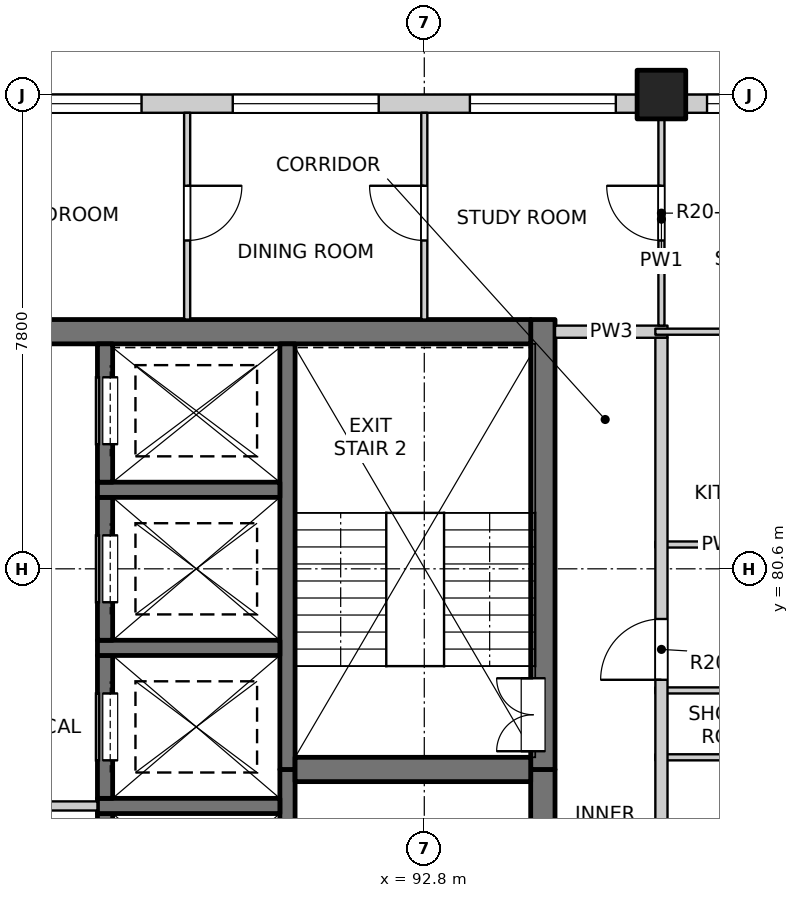
"""IFC4 building model, lengths in metres.
Left out: names, types, materials, properties, quantities, classifications, styles, units other than length and angle.
Written with IfcOpenShell. Run it as: python <this file> out.ifc"""

import sys

from ifc_helpers import new_model, si_unit, direction, frame, frame_2d, origin, origin_2d, place, context, subcontext, project, spatial, rectangle, extrude, element, fill, save


model = new_model("IFC4")
c1 = context("Model", 3, precision=1e-05, world=origin(), true_north=direction((0.0, 1.0)))
c2 = subcontext(c1, "Body", "Model", "MODEL_VIEW")
j1 = project(units=[si_unit("LENGTHUNIT", "METRE"), si_unit("PLANEANGLEUNIT", "RADIAN")], contexts=[c1])
p1 = place(None, origin())
s1 = spatial("IfcSite", under=j1, at=p1, CompositionType="ELEMENT")
p2 = place(p1, origin())
s2 = spatial("IfcBuilding", under=s1, at=p2, CompositionType="ELEMENT")
p3 = place(p2, frame((0.0, 0.0, 210.9)))
s3 = spatial("IfcBuildingStorey", under=s2, at=p3, CompositionType="ELEMENT", Elevation=210.9)
p4 = place(p3, frame((96.7, 88.4, -0.25), z_axis=(0.0, 0.0, 1.0), x_axis=(1.0, 0.0, 0.0)))
e1 = element("IfcColumn", 1, at=p4, inside=s3, PredefinedType="COLUMN", context=c2, shape_type="SweptSolid", body=[
    extrude(rectangle(XDim=0.8, YDim=0.8, at=origin_2d()), origin(), (0.0, 0.0, 1.0), 3.4),
])
p5 = place(p3, frame((94.75, 61.95, -0.25), z_axis=(0.0, 0.0, 1.0), x_axis=(0.0, 1.0, 0.0)))
e2 = element("IfcWall", 2, at=p5, inside=s3, PredefinedType="SOLIDWALL", context=c2, shape_type="SweptSolid", body=[
    extrude(rectangle(XDim=15.35, YDim=0.4, at=frame_2d((7.675, 0.0))), origin(), (0.0, 0.0, 1.0), 3.4),
])
p6 = place(p5, frame((0.925, 0.0, 0.25)))
e3 = element("IfcOpeningElement", 3, at=p6, cuts=e2, PredefinedType="OPENING", context=c2, shape_type="SweptSolid", body=[
    extrude(rectangle(XDim=0.9, YDim=2.1, at=frame_2d((0.45, 1.05))), frame((0.0, 0.21, 0.0), z_axis=(0.0, -1.0, 0.0), x_axis=(1.0, 0.0, 0.0)), (0.0, 0.0, 1.0), 0.42),
])
p7 = place(p5, frame((5.15, 0.0, 0.25)))
e4 = element("IfcOpeningElement", 4, at=p7, cuts=e2, PredefinedType="OPENING", context=c2, shape_type="SweptSolid", body=[
    extrude(rectangle(XDim=0.9, YDim=2.1, at=frame_2d((0.45, 1.05))), frame((0.0, 0.21, 0.0), z_axis=(0.0, -1.0, 0.0), x_axis=(1.0, 0.0, 0.0)), (0.0, 0.0, 1.0), 0.42),
])
p8 = place(p5, frame((9.65, 0.0, 0.25)))
e5 = element("IfcOpeningElement", 5, at=p8, cuts=e2, PredefinedType="OPENING", context=c2, shape_type="SweptSolid", body=[
    extrude(rectangle(XDim=0.9, YDim=2.1, at=frame_2d((0.45, 1.05))), frame((0.0, 0.21, 0.0), z_axis=(0.0, -1.0, 0.0), x_axis=(1.0, 0.0, 0.0)), (0.0, 0.0, 1.0), 0.42),
])
p9 = place(p5, frame((13.1, 0.0, 0.25)))
e6 = element("IfcOpeningElement", 6, at=p9, cuts=e2, PredefinedType="OPENING", context=c2, shape_type="SweptSolid", body=[
    extrude(rectangle(XDim=0.9, YDim=2.1, at=frame_2d((0.45, 1.05))), frame((0.0, 0.21, 0.0), z_axis=(0.0, -1.0, 0.0), x_axis=(1.0, 0.0, 0.0)), (0.0, 0.0, 1.0), 0.42),
])
p10 = place(p3, frame((94.75, 77.3, -0.25), z_axis=(0.0, 0.0, 1.0), x_axis=(0.0, 1.0, 0.0)))
e7 = element("IfcWall", 7, at=p10, inside=s3, PredefinedType="SOLIDWALL", context=c2, shape_type="SweptSolid", body=[
    extrude(rectangle(XDim=7.4, YDim=0.4, at=frame_2d((3.7, 0.0))), origin(), (0.0, 0.0, 1.0), 3.4),
])
p11 = place(p10, frame((0.3, 0.0, 0.25)))
e8 = element("IfcOpeningElement", 8, at=p11, cuts=e7, PredefinedType="OPENING", context=c2, shape_type="SweptSolid", body=[
    extrude(rectangle(XDim=1.2, YDim=2.1, at=frame_2d((0.6, 1.05))), frame((0.0, 0.21, 0.0), z_axis=(0.0, -1.0, 0.0), x_axis=(1.0, 0.0, 0.0)), (0.0, 0.0, 1.0), 0.42),
])
p12 = place(p3, frame((75.45, 84.5, -0.25), z_axis=(0.0, 0.0, 1.0), x_axis=(1.0, 0.0, 0.0)))
e9 = element("IfcWall", 9, at=p12, inside=s3, PredefinedType="SOLIDWALL", context=c2, shape_type="SweptSolid", body=[
    extrude(rectangle(XDim=19.1, YDim=0.4, at=frame_2d((9.55, 0.0))), origin(), (0.0, 0.0, 1.0), 3.4),
])
p13 = place(p3, frame((90.55, 61.95, -0.25), z_axis=(0.0, 0.0, 1.0), x_axis=(0.0, 1.0, 0.0)))
e10 = element("IfcWall", 10, at=p13, inside=s3, PredefinedType="SOLIDWALL", context=c2, shape_type="SweptSolid", body=[
    extrude(rectangle(XDim=15.35, YDim=0.25, at=frame_2d((7.675, 0.0))), origin(), (0.0, 0.0, 1.0), 3.4),
])
p14 = place(p3, frame((90.55, 77.3, -0.25), z_axis=(0.0, 0.0, 1.0), x_axis=(0.0, 1.0, 0.0)))
e11 = element("IfcWall", 11, at=p14, inside=s3, PredefinedType="SOLIDWALL", context=c2, shape_type="SweptSolid", body=[
    extrude(rectangle(XDim=7.0, YDim=0.25, at=frame_2d((3.5, 0.0))), origin(), (0.0, 0.0, 1.0), 3.4),
])
p15 = place(p3, frame((87.55, 74.225, -0.25), z_axis=(0.0, 0.0, 1.0), x_axis=(0.0, 1.0, 0.0)))
e12 = element("IfcWall", 12, at=p15, inside=s3, PredefinedType="SOLIDWALL", context=c2, shape_type="SweptSolid", body=[
    extrude(rectangle(XDim=2.35, YDim=0.25, at=frame_2d((1.175, 0.0))), origin(), (0.0, 0.0, 1.0), 3.4),
])
p16 = place(p15, frame((0.625, 0.0, 0.25)))
e13 = element("IfcOpeningElement", 13, at=p16, cuts=e12, PredefinedType="OPENING", context=c2, shape_type="SweptSolid", body=[
    extrude(rectangle(XDim=1.1, YDim=2.1, at=frame_2d((0.55, 1.05))), frame((0.0, 0.135, 0.0), z_axis=(0.0, -1.0, 0.0), x_axis=(1.0, 0.0, 0.0)), (0.0, 0.0, 1.0), 0.27),
])
p17 = place(p3, frame((87.425, 76.7, -0.25), z_axis=(0.0, 0.0, 1.0), x_axis=(1.0, 0.0, 0.0)))
e14 = element("IfcWall", 14, at=p17, inside=s3, PredefinedType="SOLIDWALL", context=c2, shape_type="SweptSolid", body=[
    extrude(rectangle(XDim=3.0, YDim=0.25, at=frame_2d((1.5, 0.0))), origin(), (0.0, 0.0, 1.0), 3.4),
])
p18 = place(p3, frame((87.55, 76.825, -0.25), z_axis=(0.0, 0.0, 1.0), x_axis=(0.0, 1.0, 0.0)))
e15 = element("IfcWall", 15, at=p18, inside=s3, PredefinedType="SOLIDWALL", context=c2, shape_type="SweptSolid", body=[
    extrude(rectangle(XDim=2.35, YDim=0.25, at=frame_2d((1.175, 0.0))), origin(), (0.0, 0.0, 1.0), 3.4),
])
p19 = place(p18, frame((0.625, 0.0, 0.25)))
e16 = element("IfcOpeningElement", 16, at=p19, cuts=e15, PredefinedType="OPENING", context=c2, shape_type="SweptSolid", body=[
    extrude(rectangle(XDim=1.1, YDim=2.1, at=frame_2d((0.55, 1.05))), frame((0.0, 0.135, 0.0), z_axis=(0.0, -1.0, 0.0), x_axis=(1.0, 0.0, 0.0)), (0.0, 0.0, 1.0), 0.27),
])
p20 = place(p3, frame((87.425, 79.3, -0.25), z_axis=(0.0, 0.0, 1.0), x_axis=(1.0, 0.0, 0.0)))
e17 = element("IfcWall", 17, at=p20, inside=s3, PredefinedType="SOLIDWALL", context=c2, shape_type="SweptSolid", body=[
    extrude(rectangle(XDim=3.0, YDim=0.25, at=frame_2d((1.5, 0.0))), origin(), (0.0, 0.0, 1.0), 3.4),
])
p21 = place(p3, frame((87.55, 79.425, -0.25), z_axis=(0.0, 0.0, 1.0), x_axis=(0.0, 1.0, 0.0)))
e18 = element("IfcWall", 18, at=p21, inside=s3, PredefinedType="SOLIDWALL", context=c2, shape_type="SweptSolid", body=[
    extrude(rectangle(XDim=2.35, YDim=0.25, at=frame_2d((1.175, 0.0))), origin(), (0.0, 0.0, 1.0), 3.4),
])
p22 = place(p21, frame((0.625, 0.0, 0.25)))
e19 = element("IfcOpeningElement", 19, at=p22, cuts=e18, PredefinedType="OPENING", context=c2, shape_type="SweptSolid", body=[
    extrude(rectangle(XDim=1.1, YDim=2.1, at=frame_2d((0.55, 1.05))), frame((0.0, 0.135, 0.0), z_axis=(0.0, -1.0, 0.0), x_axis=(1.0, 0.0, 0.0)), (0.0, 0.0, 1.0), 0.27),
])
p23 = place(p3, frame((87.425, 81.9, -0.25), z_axis=(0.0, 0.0, 1.0), x_axis=(1.0, 0.0, 0.0)))
e20 = element("IfcWall", 20, at=p23, inside=s3, PredefinedType="SOLIDWALL", context=c2, shape_type="SweptSolid", body=[
    extrude(rectangle(XDim=3.0, YDim=0.25, at=frame_2d((1.5, 0.0))), origin(), (0.0, 0.0, 1.0), 3.4),
])
p24 = place(p3, frame((87.55, 82.025, -0.25), z_axis=(0.0, 0.0, 1.0), x_axis=(0.0, 1.0, 0.0)))
e21 = element("IfcWall", 21, at=p24, inside=s3, PredefinedType="SOLIDWALL", context=c2, shape_type="SweptSolid", body=[
    extrude(rectangle(XDim=2.275, YDim=0.25, at=frame_2d((1.138, 0.0))), origin(), (0.0, 0.0, 1.0), 3.4),
])
p25 = place(p24, frame((0.625, 0.0, 0.25)))
e22 = element("IfcOpeningElement", 22, at=p25, cuts=e21, PredefinedType="OPENING", context=c2, shape_type="SweptSolid", body=[
    extrude(rectangle(XDim=1.1, YDim=2.1, at=frame_2d((0.55, 1.05))), frame((0.0, 0.135, 0.0), z_axis=(0.0, -1.0, 0.0), x_axis=(1.0, 0.0, 0.0)), (0.0, 0.0, 1.0), 0.27),
])
p26 = place(p3, frame((90.675, 77.3, -0.25), z_axis=(0.0, 0.0, 1.0), x_axis=(1.0, 0.0, 0.0)))
e23 = element("IfcWall", 23, at=p26, inside=s3, PredefinedType="SOLIDWALL", context=c2, shape_type="SweptSolid", body=[
    extrude(rectangle(XDim=3.875, YDim=0.4, at=frame_2d((1.938, 0.0))), origin(), (0.0, 0.0, 1.0), 3.4),
])
p27 = place(p3, frame((73.7, 88.25, 0.0), z_axis=(0.0, 0.0, 1.0), x_axis=(1.0, 0.0, 0.0)))
e24 = element("IfcWall", 24, at=p27, inside=s3, PredefinedType="SOLIDWALL", context=c2, shape_type="SweptSolid", body=[
    extrude(rectangle(XDim=22.6, YDim=0.3, at=frame_2d((11.3, 0.0))), origin(), (0.0, 0.0, 1.0), 2.7),
])
p28 = place(p27, frame((0.35, 0.0, 0.9)))
e25 = element("IfcOpeningElement", 25, at=p28, cuts=e24, PredefinedType="OPENING", context=c2, shape_type="SweptSolid", body=[
    extrude(rectangle(XDim=2.4, YDim=1.8, at=frame_2d((1.2, 0.9))), frame((0.0, 0.16, 0.0), z_axis=(0.0, -1.0, 0.0), x_axis=(1.0, 0.0, 0.0)), (0.0, 0.0, 1.0), 0.32),
])
p29 = place(p27, frame((4.25, 0.0, 0.9)))
e26 = element("IfcOpeningElement", 26, at=p29, cuts=e24, PredefinedType="OPENING", context=c2, shape_type="SweptSolid", body=[
    extrude(rectangle(XDim=2.4, YDim=1.8, at=frame_2d((1.2, 0.9))), frame((0.0, 0.16, 0.0), z_axis=(0.0, -1.0, 0.0), x_axis=(1.0, 0.0, 0.0)), (0.0, 0.0, 1.0), 0.32),
])
p30 = place(p27, frame((8.15, 0.0, 0.9)))
e27 = element("IfcOpeningElement", 27, at=p30, cuts=e24, PredefinedType="OPENING", context=c2, shape_type="SweptSolid", body=[
    extrude(rectangle(XDim=2.4, YDim=1.8, at=frame_2d((1.2, 0.9))), frame((0.0, 0.16, 0.0), z_axis=(0.0, -1.0, 0.0), x_axis=(1.0, 0.0, 0.0)), (0.0, 0.0, 1.0), 0.32),
])
p31 = place(p27, frame((12.05, 0.0, 0.9)))
e28 = element("IfcOpeningElement", 28, at=p31, cuts=e24, PredefinedType="OPENING", context=c2, shape_type="SweptSolid", body=[
    extrude(rectangle(XDim=2.4, YDim=1.8, at=frame_2d((1.2, 0.9))), frame((0.0, 0.16, 0.0), z_axis=(0.0, -1.0, 0.0), x_axis=(1.0, 0.0, 0.0)), (0.0, 0.0, 1.0), 0.32),
])
p32 = place(p27, frame((15.95, 0.0, 0.9)))
e29 = element("IfcOpeningElement", 29, at=p32, cuts=e24, PredefinedType="OPENING", context=c2, shape_type="SweptSolid", body=[
    extrude(rectangle(XDim=2.4, YDim=1.8, at=frame_2d((1.2, 0.9))), frame((0.0, 0.16, 0.0), z_axis=(0.0, -1.0, 0.0), x_axis=(1.0, 0.0, 0.0)), (0.0, 0.0, 1.0), 0.32),
])
p33 = place(p27, frame((19.85, 0.0, 0.9)))
e30 = element("IfcOpeningElement", 30, at=p33, cuts=e24, PredefinedType="OPENING", context=c2, shape_type="SweptSolid", body=[
    extrude(rectangle(XDim=2.4, YDim=1.8, at=frame_2d((1.2, 0.9))), frame((0.0, 0.16, 0.0), z_axis=(0.0, -1.0, 0.0), x_axis=(1.0, 0.0, 0.0)), (0.0, 0.0, 1.0), 0.32),
])
p34 = place(p3, frame((97.1, 88.25, 0.0), z_axis=(0.0, 0.0, 1.0), x_axis=(1.0, 0.0, 0.0)))
e31 = element("IfcWall", 31, at=p34, inside=s3, PredefinedType="SOLIDWALL", context=c2, shape_type="SweptSolid", body=[
    extrude(rectangle(XDim=7.4, YDim=0.3, at=frame_2d((3.7, 0.0))), origin(), (0.0, 0.0, 1.0), 2.7),
])
p35 = place(p34, frame((0.35, 0.0, 0.9)))
e32 = element("IfcOpeningElement", 32, at=p35, cuts=e31, PredefinedType="OPENING", context=c2, shape_type="SweptSolid", body=[
    extrude(rectangle(XDim=2.4, YDim=1.8, at=frame_2d((1.2, 0.9))), frame((0.0, 0.16, 0.0), z_axis=(0.0, -1.0, 0.0), x_axis=(1.0, 0.0, 0.0)), (0.0, 0.0, 1.0), 0.32),
])
p36 = place(p34, frame((4.25, 0.0, 0.9)))
e33 = element("IfcOpeningElement", 33, at=p36, cuts=e31, PredefinedType="OPENING", context=c2, shape_type="SweptSolid", body=[
    extrude(rectangle(XDim=2.4, YDim=1.8, at=frame_2d((1.2, 0.9))), frame((0.0, 0.16, 0.0), z_axis=(0.0, -1.0, 0.0), x_axis=(1.0, 0.0, 0.0)), (0.0, 0.0, 1.0), 0.32),
])
p37 = place(p3, frame((82.575, 76.7, 0.0), z_axis=(0.0, 0.0, 1.0), x_axis=(1.0, 0.0, 0.0)))
e34 = element("IfcWall", 34, at=p37, inside=s3, PredefinedType="PARTITIONING", context=c2, shape_type="SweptSolid", body=[
    extrude(rectangle(XDim=4.85, YDim=0.15, at=frame_2d((2.425, 0.0))), origin(), (0.0, 0.0, 1.0), 3.15),
])
p38 = place(p37, frame((1.525, 0.0, 0.0)))
e35 = element("IfcOpeningElement", 35, at=p38, cuts=e34, PredefinedType="OPENING", context=c2, shape_type="SweptSolid", body=[
    extrude(rectangle(XDim=1.8, YDim=2.1, at=frame_2d((0.9, 1.05))), frame((0.0, 0.085, 0.0), z_axis=(0.0, -1.0, 0.0), x_axis=(1.0, 0.0, 0.0)), (0.0, 0.0, 1.0), 0.17),
])
for number, where, z_axis, x_axis in (
    (36, (96.6, 77.5, 0.0), (0.0, 0.0, 1.0), (1.0, 0.0, 0.0)),
    (37, (96.6, 78.6, 0.0), (0.0, 0.0, 1.0), (1.0, 0.0, 0.0)),
    (38, (96.6, 81.0, 0.0), (0.0, 0.0, 1.0), (1.0, 0.0, 0.0)),
):
    element("IfcWall", number, at=place(p3, frame(where, z_axis=z_axis, x_axis=x_axis)), inside=s3, PredefinedType="PARTITIONING", context=c2, shape_type="SweptSolid", body=[
        extrude(rectangle(XDim=2.22, YDim=0.1, at=frame_2d((1.11, 0.0))), origin(), (0.0, 0.0, 1.0), 3.15),
    ])
p39 = place(p3, frame((94.95, 84.5, 0.0), z_axis=(0.0, 0.0, 1.0), x_axis=(1.0, 0.0, 0.0)))
e39 = element("IfcWall", 39, at=p39, inside=s3, PredefinedType="PARTITIONING", context=c2, shape_type="SweptSolid", body=[
    extrude(rectangle(XDim=1.85, YDim=0.2, at=frame_2d((0.925, 0.0))), origin(), (0.0, 0.0, 1.0), 3.15),
])
p40 = place(p3, frame((96.6, 84.5, 0.0), z_axis=(0.0, 0.0, 1.0), x_axis=(1.0, 0.0, 0.0)))
e40 = element("IfcWall", 40, at=p40, inside=s3, PredefinedType="PARTITIONING", context=c2, shape_type="SweptSolid", body=[
    extrude(rectangle(XDim=11.5, YDim=0.1, at=frame_2d((5.75, 0.0))), origin(), (0.0, 0.0, 1.0), 3.15),
])
p41 = place(p40, frame((2.635, 0.0, 0.0)))
e41 = element("IfcOpeningElement", 41, at=p41, cuts=e40, PredefinedType="OPENING", context=c2, shape_type="SweptSolid", body=[
    extrude(rectangle(XDim=0.9, YDim=2.1, at=frame_2d((0.45, 1.05))), frame((0.0, 0.06, 0.0), z_axis=(0.0, -1.0, 0.0), x_axis=(1.0, 0.0, 0.0)), (0.0, 0.0, 1.0), 0.12),
])
p42 = place(p3, frame((88.9, 84.7, 0.0), z_axis=(0.0, 0.0, 1.0), x_axis=(0.0, 1.0, 0.0)))
e42 = element("IfcWall", 42, at=p42, inside=s3, PredefinedType="PARTITIONING", context=c2, shape_type="SweptSolid", body=[
    extrude(rectangle(XDim=3.4, YDim=0.1, at=frame_2d((1.7, 0.0))), origin(), (0.0, 0.0, 1.0), 3.15),
])
p43 = place(p42, frame((1.3, 0.0, 0.0)))
e43 = element("IfcOpeningElement", 43, at=p43, cuts=e42, PredefinedType="OPENING", context=c2, shape_type="SweptSolid", body=[
    extrude(rectangle(XDim=0.9, YDim=2.1, at=frame_2d((0.45, 1.05))), frame((0.0, 0.06, 0.0), z_axis=(0.0, -1.0, 0.0), x_axis=(1.0, 0.0, 0.0)), (0.0, 0.0, 1.0), 0.12),
])
p44 = place(p3, frame((92.8, 84.7, 0.0), z_axis=(0.0, 0.0, 1.0), x_axis=(0.0, 1.0, 0.0)))
e44 = element("IfcWall", 44, at=p44, inside=s3, PredefinedType="PARTITIONING", context=c2, shape_type="SweptSolid", body=[
    extrude(rectangle(XDim=3.4, YDim=0.1, at=frame_2d((1.7, 0.0))), origin(), (0.0, 0.0, 1.0), 3.15),
])
p45 = place(p44, frame((1.3, 0.0, 0.0)))
e45 = element("IfcOpeningElement", 45, at=p45, cuts=e44, PredefinedType="OPENING", context=c2, shape_type="SweptSolid", body=[
    extrude(rectangle(XDim=0.9, YDim=2.1, at=frame_2d((0.45, 1.05))), frame((0.0, 0.06, 0.0), z_axis=(0.0, -1.0, 0.0), x_axis=(1.0, 0.0, 0.0)), (0.0, 0.0, 1.0), 0.12),
])
p46 = place(p3, frame((96.7, 49.5, 0.0), z_axis=(0.0, 0.0, 1.0), x_axis=(0.0, 1.0, 0.0)))
e46 = element("IfcWall", 46, at=p46, inside=s3, PredefinedType="PARTITIONING", context=c2, shape_type="SweptSolid", body=[
    extrude(rectangle(XDim=34.9, YDim=0.2, at=frame_2d((17.45, 0.0))), origin(), (0.0, 0.0, 1.0), 3.15),
])
p47 = place(p46, frame((9.625, 0.0, 0.0)))
e47 = element("IfcOpeningElement", 47, at=p47, cuts=e46, PredefinedType="OPENING", context=c2, shape_type="SweptSolid", body=[
    extrude(rectangle(XDim=1.0, YDim=2.1, at=frame_2d((0.5, 1.05))), frame((0.0, 0.11, 0.0), z_axis=(0.0, -1.0, 0.0), x_axis=(1.0, 0.0, 0.0)), (0.0, 0.0, 1.0), 0.22),
])
p48 = place(p46, frame((14.125, 0.0, 0.0)))
e48 = element("IfcOpeningElement", 48, at=p48, cuts=e46, PredefinedType="OPENING", context=c2, shape_type="SweptSolid", body=[
    extrude(rectangle(XDim=1.0, YDim=2.1, at=frame_2d((0.5, 1.05))), frame((0.0, 0.11, 0.0), z_axis=(0.0, -1.0, 0.0), x_axis=(1.0, 0.0, 0.0)), (0.0, 0.0, 1.0), 0.22),
])
p49 = place(p46, frame((29.275, 0.0, 0.0)))
e49 = element("IfcOpeningElement", 49, at=p49, cuts=e46, PredefinedType="OPENING", context=c2, shape_type="SweptSolid", body=[
    extrude(rectangle(XDim=1.0, YDim=2.1, at=frame_2d((0.5, 1.05))), frame((0.0, 0.11, 0.0), z_axis=(0.0, -1.0, 0.0), x_axis=(1.0, 0.0, 0.0)), (0.0, 0.0, 1.0), 0.22),
])
p50 = place(p3, frame((96.7, 84.6, 0.0), z_axis=(0.0, 0.0, 1.0), x_axis=(0.0, 1.0, 0.0)))
e50 = element("IfcWall", 50, at=p50, inside=s3, PredefinedType="PARTITIONING", context=c2, shape_type="SweptSolid", body=[
    extrude(rectangle(XDim=3.5, YDim=0.1, at=frame_2d((1.75, 0.0))), origin(), (0.0, 0.0, 1.0), 3.15),
])
p51 = place(p50, frame((1.4, 0.0, 0.0)))
e51 = element("IfcOpeningElement", 51, at=p51, cuts=e50, PredefinedType="OPENING", context=c2, shape_type="SweptSolid", body=[
    extrude(rectangle(XDim=0.9, YDim=2.1, at=frame_2d((0.45, 1.05))), frame((0.0, 0.06, 0.0), z_axis=(0.0, -1.0, 0.0), x_axis=(1.0, 0.0, 0.0)), (0.0, 0.0, 1.0), 0.12),
])
p52 = place(p31, origin())
e52 = element("IfcWindow", 52, at=p52, inside=s3, PartitioningType="DOUBLE_PANEL_VERTICAL", PredefinedType="WINDOW", context=c2, shape_type="SweptSolid", body=[
    extrude(rectangle(XDim=2.4, YDim=1.8, at=frame_2d((1.2, 0.9))), frame((0.0, 0.03, 0.0), z_axis=(0.0, -1.0, 0.0), x_axis=(1.0, 0.0, 0.0)), (0.0, 0.0, 1.0), 0.06),
])
fill(e28, e52)
p53 = place(p32, origin())
e53 = element("IfcWindow", 53, at=p53, inside=s3, PartitioningType="DOUBLE_PANEL_VERTICAL", PredefinedType="WINDOW", context=c2, shape_type="SweptSolid", body=[
    extrude(rectangle(XDim=2.4, YDim=1.8, at=frame_2d((1.2, 0.9))), frame((0.0, 0.03, 0.0), z_axis=(0.0, -1.0, 0.0), x_axis=(1.0, 0.0, 0.0)), (0.0, 0.0, 1.0), 0.06),
])
fill(e29, e53)
p54 = place(p33, origin())
e54 = element("IfcWindow", 54, at=p54, inside=s3, PartitioningType="DOUBLE_PANEL_VERTICAL", PredefinedType="WINDOW", context=c2, shape_type="SweptSolid", body=[
    extrude(rectangle(XDim=2.4, YDim=1.8, at=frame_2d((1.2, 0.9))), frame((0.0, 0.03, 0.0), z_axis=(0.0, -1.0, 0.0), x_axis=(1.0, 0.0, 0.0)), (0.0, 0.0, 1.0), 0.06),
])
fill(e30, e54)
p55 = place(p35, origin())
e55 = element("IfcWindow", 55, at=p55, inside=s3, PartitioningType="DOUBLE_PANEL_VERTICAL", PredefinedType="WINDOW", context=c2, shape_type="SweptSolid", body=[
    extrude(rectangle(XDim=2.4, YDim=1.8, at=frame_2d((1.2, 0.9))), frame((0.0, 0.03, 0.0), z_axis=(0.0, -1.0, 0.0), x_axis=(1.0, 0.0, 0.0)), (0.0, 0.0, 1.0), 0.06),
])
fill(e32, e55)
p56 = place(p19, origin())
e56 = element("IfcDoor", 56, at=p56, inside=s3, OperationType="SLIDING_TO_LEFT", PredefinedType="DOOR", context=c2, shape_type="SweptSolid", body=[
    extrude(rectangle(XDim=1.1, YDim=2.1, at=frame_2d((0.55, 1.05))), frame((0.0, -0.06, 0.0), z_axis=(0.0, -1.0, 0.0), x_axis=(1.0, 0.0, 0.0)), (0.0, 0.0, 1.0), 0.05),
])
fill(e16, e56)
p57 = place(p11, origin())
e57 = element("IfcDoor", 57, at=p57, inside=s3, OperationType="DOUBLE_DOOR_SINGLE_SWING", PredefinedType="DOOR", context=c2, shape_type="SweptSolid", body=[
    extrude(rectangle(XDim=1.2, YDim=2.1, at=frame_2d((0.6, 1.05))), frame((0.0, 0.185, 0.0), z_axis=(0.0, -1.0, 0.0), x_axis=(1.0, 0.0, 0.0)), (0.0, 0.0, 1.0), 0.05),
])
fill(e8, e57)
p58 = place(p49, origin())
e58 = element("IfcDoor", 58, at=p58, inside=s3, OperationType="SINGLE_SWING_LEFT", PredefinedType="DOOR", context=c2, shape_type="SweptSolid", body=[
    extrude(rectangle(XDim=1.0, YDim=2.1, at=frame_2d((0.5, 1.05))), frame((0.0, 0.025, 0.0), z_axis=(0.0, -1.0, 0.0), x_axis=(1.0, 0.0, 0.0)), (0.0, 0.0, 1.0), 0.05),
])
fill(e49, e58)
p59 = place(p22, origin())
e59 = element("IfcDoor", 59, at=p59, inside=s3, OperationType="SLIDING_TO_RIGHT", PredefinedType="DOOR", context=c2, shape_type="SweptSolid", body=[
    extrude(rectangle(XDim=1.1, YDim=2.1, at=frame_2d((0.55, 1.05))), frame((0.0, -0.06, 0.0), z_axis=(0.0, -1.0, 0.0), x_axis=(1.0, 0.0, 0.0)), (0.0, 0.0, 1.0), 0.05),
])
fill(e19, e59)
p60 = place(p25, origin())
e60 = element("IfcDoor", 60, at=p60, inside=s3, OperationType="SLIDING_TO_RIGHT", PredefinedType="DOOR", context=c2, shape_type="SweptSolid", body=[
    extrude(rectangle(XDim=1.1, YDim=2.1, at=frame_2d((0.55, 1.05))), frame((0.0, -0.06, 0.0), z_axis=(0.0, -1.0, 0.0), x_axis=(1.0, 0.0, 0.0)), (0.0, 0.0, 1.0), 0.05),
])
fill(e22, e60)
p61 = place(p43, origin())
e61 = element("IfcDoor", 61, at=p61, inside=s3, OperationType="SINGLE_SWING_LEFT", PredefinedType="DOOR", context=c2, shape_type="SweptSolid", body=[
    extrude(rectangle(XDim=0.9, YDim=2.1, at=frame_2d((0.45, 1.05))), frame((0.0, 0.025, 0.0), z_axis=(0.0, -1.0, 0.0), x_axis=(1.0, 0.0, 0.0)), (0.0, 0.0, 1.0), 0.05),
])
fill(e43, e61)
p62 = place(p45, origin())
e62 = element("IfcDoor", 62, at=p62, inside=s3, OperationType="SINGLE_SWING_RIGHT", PredefinedType="DOOR", context=c2, shape_type="SweptSolid", body=[
    extrude(rectangle(XDim=0.9, YDim=2.1, at=frame_2d((0.45, 1.05))), frame((0.0, 0.025, 0.0), z_axis=(0.0, -1.0, 0.0), x_axis=(1.0, 0.0, 0.0)), (0.0, 0.0, 1.0), 0.05),
])
fill(e45, e62)
p63 = place(p51, origin())
e63 = element("IfcDoor", 63, at=p63, inside=s3, OperationType="SINGLE_SWING_RIGHT", PredefinedType="DOOR", context=c2, shape_type="SweptSolid", body=[
    extrude(rectangle(XDim=0.9, YDim=2.1, at=frame_2d((0.45, 1.05))), frame((0.0, 0.025, 0.0), z_axis=(0.0, -1.0, 0.0), x_axis=(1.0, 0.0, 0.0)), (0.0, 0.0, 1.0), 0.05),
])
fill(e51, e63)
save(model, sys.argv[1])
